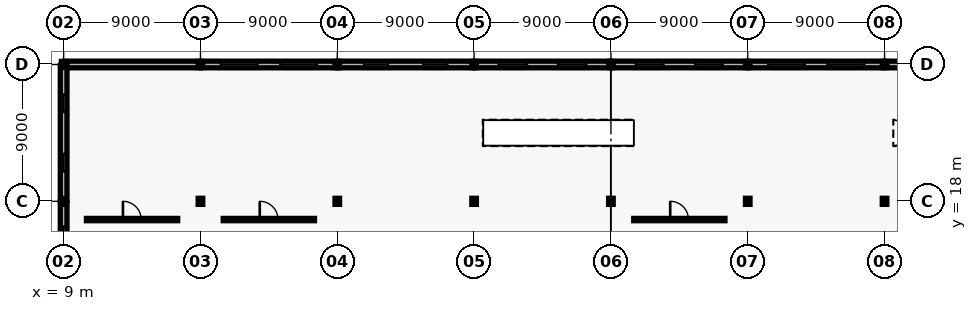
"""IFC4 building model, lengths in metres.
Left out: names, types, materials, properties, quantities, classifications, styles, units other than length and angle.
Written with IfcOpenShell. Run it as: python <this file> out.ifc"""

import sys

from ifc_helpers import new_model, si_unit, direction, frame, frame_2d, origin, origin_2d, place, context, subcontext, project, spatial, rectangle, i_section, extrude, element, fill, save


model = new_model("IFC4")
c1 = context("Model", 3, precision=1e-05, world=origin(), true_north=direction((0.0, 1.0)))
c2 = subcontext(c1, "Body", "Model", "MODEL_VIEW")
j1 = project(units=[si_unit("LENGTHUNIT", "METRE"), si_unit("PLANEANGLEUNIT", "RADIAN")], contexts=[c1])
p1 = place(None, origin())
s1 = spatial("IfcSite", under=j1, at=p1, CompositionType="ELEMENT")
p2 = place(p1, origin())
s2 = spatial("IfcBuilding", under=s1, at=p2, CompositionType="ELEMENT")
p3 = place(p2, frame((0.0, 0.0, 5.4)))
s3 = spatial("IfcBuildingStorey", under=s2, at=p3, CompositionType="ELEMENT", Elevation=5.4)
for number, where, z_axis, x_axis in (
    (1, (9.0, 18.0, 0.0), (0.0, 0.0, 1.0), (1.0, 0.0, 0.0)),
    (2, (9.0, 27.0, 0.0), (0.0, 0.0, 1.0), (1.0, 0.0, 0.0)),
    (3, (18.0, 18.0, 0.0), (0.0, 0.0, 1.0), (1.0, 0.0, 0.0)),
    (4, (18.0, 27.0, 0.0), (0.0, 0.0, 1.0), (1.0, 0.0, 0.0)),
    (5, (27.0, 18.0, 0.0), (0.0, 0.0, 1.0), (1.0, 0.0, 0.0)),
    (6, (27.0, 27.0, 0.0), (0.0, 0.0, 1.0), (1.0, 0.0, 0.0)),
    (7, (36.0, 18.0, 0.0), (0.0, 0.0, 1.0), (1.0, 0.0, 0.0)),
    (8, (36.0, 27.0, 0.0), (0.0, 0.0, 1.0), (1.0, 0.0, 0.0)),
    (9, (45.0, 18.0, 0.0), (0.0, 0.0, 1.0), (1.0, 0.0, 0.0)),
    (10, (45.0, 27.0, 0.0), (0.0, 0.0, 1.0), (1.0, 0.0, 0.0)),
    (11, (54.0, 18.0, 0.0), (0.0, 0.0, 1.0), (1.0, 0.0, 0.0)),
    (12, (54.0, 27.0, 0.0), (0.0, 0.0, 1.0), (1.0, 0.0, 0.0)),
    (13, (63.0, 18.0, 0.0), (0.0, 0.0, 1.0), (1.0, 0.0, 0.0)),
    (14, (63.0, 27.0, 0.0), (0.0, 0.0, 1.0), (1.0, 0.0, 0.0)),
):
    element("IfcColumn", number, at=place(p3, frame(where, z_axis=z_axis, x_axis=x_axis)), inside=s3, PredefinedType="COLUMN", context=c2, shape_type="SweptSolid", body=[
        extrude(i_section(OverallWidth=0.3, OverallDepth=0.4, WebThickness=0.013, FlangeThickness=0.024, FilletRadius=0.027, at=origin_2d()), origin(), (0.0, 0.0, 1.0), 4.2),
    ])
p4 = place(p3, frame((9.06, 27.0, 0.0), z_axis=(0.0, 0.0, 1.0), x_axis=(1.0, 0.0, 0.0)))
e15 = element("IfcWall", 15, at=p4, inside=s3, PredefinedType="SOLIDWALL", context=c2, shape_type="SweptSolid", body=[
    extrude(rectangle(XDim=8.88, YDim=0.44, at=frame_2d((4.44, 0.0))), origin(), (0.0, 0.0, 1.0), 3.5),
])
p5 = place(p3, frame((18.06, 27.0, 0.0), z_axis=(0.0, 0.0, 1.0), x_axis=(1.0, 0.0, 0.0)))
e16 = element("IfcWall", 16, at=p5, inside=s3, PredefinedType="SOLIDWALL", context=c2, shape_type="SweptSolid", body=[
    extrude(rectangle(XDim=8.88, YDim=0.44, at=frame_2d((4.44, 0.0))), origin(), (0.0, 0.0, 1.0), 3.5),
])
p6 = place(p5, frame((1.286, 0.0, 0.9)))
e17 = element("IfcOpeningElement", 17, at=p6, cuts=e16, PredefinedType="OPENING", context=c2, shape_type="SweptSolid", body=[
    extrude(rectangle(XDim=2.4, YDim=2.1, at=frame_2d((1.2, 1.05))), frame((0.0, 0.23, 0.0), z_axis=(0.0, -1.0, 0.0), x_axis=(1.0, 0.0, 0.0)), (0.0, 0.0, 1.0), 0.46),
])
p7 = place(p5, frame((5.194, 0.0, 0.9)))
e18 = element("IfcOpeningElement", 18, at=p7, cuts=e16, PredefinedType="OPENING", context=c2, shape_type="SweptSolid", body=[
    extrude(rectangle(XDim=2.4, YDim=2.1, at=frame_2d((1.2, 1.05))), frame((0.0, 0.23, 0.0), z_axis=(0.0, -1.0, 0.0), x_axis=(1.0, 0.0, 0.0)), (0.0, 0.0, 1.0), 0.46),
])
p8 = place(p3, frame((27.06, 27.0, 0.0), z_axis=(0.0, 0.0, 1.0), x_axis=(1.0, 0.0, 0.0)))
e19 = element("IfcWall", 19, at=p8, inside=s3, PredefinedType="SOLIDWALL", context=c2, shape_type="SweptSolid", body=[
    extrude(rectangle(XDim=8.88, YDim=0.44, at=frame_2d((4.44, 0.0))), origin(), (0.0, 0.0, 1.0), 3.5),
])
p9 = place(p8, frame((1.711, 0.0, 0.9)))
e20 = element("IfcOpeningElement", 20, at=p9, cuts=e19, PredefinedType="OPENING", context=c2, shape_type="SweptSolid", body=[
    extrude(rectangle(XDim=1.55, YDim=1.95, at=frame_2d((0.775, 0.975))), frame((0.0, 0.23, 0.0), z_axis=(0.0, -1.0, 0.0), x_axis=(1.0, 0.0, 0.0)), (0.0, 0.0, 1.0), 0.46),
])
p10 = place(p8, frame((5.619, 0.0, 0.9)))
e21 = element("IfcOpeningElement", 21, at=p10, cuts=e19, PredefinedType="OPENING", context=c2, shape_type="SweptSolid", body=[
    extrude(rectangle(XDim=1.55, YDim=1.95, at=frame_2d((0.775, 0.975))), frame((0.0, 0.23, 0.0), z_axis=(0.0, -1.0, 0.0), x_axis=(1.0, 0.0, 0.0)), (0.0, 0.0, 1.0), 0.46),
])
p11 = place(p3, frame((36.06, 27.0, 0.0), z_axis=(0.0, 0.0, 1.0), x_axis=(1.0, 0.0, 0.0)))
e22 = element("IfcWall", 22, at=p11, inside=s3, PredefinedType="SOLIDWALL", context=c2, shape_type="SweptSolid", body=[
    extrude(rectangle(XDim=8.88, YDim=0.44, at=frame_2d((4.44, 0.0))), origin(), (0.0, 0.0, 1.0), 3.5),
])
p12 = place(p11, frame((1.561, 0.0, 0.9)))
e23 = element("IfcOpeningElement", 23, at=p12, cuts=e22, PredefinedType="OPENING", context=c2, shape_type="SweptSolid", body=[
    extrude(rectangle(XDim=1.85, YDim=2.05, at=frame_2d((0.925, 1.025))), frame((0.0, 0.23, 0.0), z_axis=(0.0, -1.0, 0.0), x_axis=(1.0, 0.0, 0.0)), (0.0, 0.0, 1.0), 0.46),
])
p13 = place(p11, frame((5.469, 0.0, 0.9)))
e24 = element("IfcOpeningElement", 24, at=p13, cuts=e22, PredefinedType="OPENING", context=c2, shape_type="SweptSolid", body=[
    extrude(rectangle(XDim=1.85, YDim=2.05, at=frame_2d((0.925, 1.025))), frame((0.0, 0.23, 0.0), z_axis=(0.0, -1.0, 0.0), x_axis=(1.0, 0.0, 0.0)), (0.0, 0.0, 1.0), 0.46),
])
p14 = place(p3, frame((45.06, 27.0, 0.0), z_axis=(0.0, 0.0, 1.0), x_axis=(1.0, 0.0, 0.0)))
e25 = element("IfcWall", 25, at=p14, inside=s3, PredefinedType="SOLIDWALL", context=c2, shape_type="SweptSolid", body=[
    extrude(rectangle(XDim=8.88, YDim=0.44, at=frame_2d((4.44, 0.0))), origin(), (0.0, 0.0, 1.0), 3.5),
])
p15 = place(p14, frame((1.586, 0.0, 0.9)))
e26 = element("IfcOpeningElement", 26, at=p15, cuts=e25, PredefinedType="OPENING", context=c2, shape_type="SweptSolid", body=[
    extrude(rectangle(XDim=1.8, YDim=2.1, at=frame_2d((0.9, 1.05))), frame((0.0, 0.23, 0.0), z_axis=(0.0, -1.0, 0.0), x_axis=(1.0, 0.0, 0.0)), (0.0, 0.0, 1.0), 0.46),
])
p16 = place(p14, frame((5.494, 0.0, 0.9)))
e27 = element("IfcOpeningElement", 27, at=p16, cuts=e25, PredefinedType="OPENING", context=c2, shape_type="SweptSolid", body=[
    extrude(rectangle(XDim=1.8, YDim=2.1, at=frame_2d((0.9, 1.05))), frame((0.0, 0.23, 0.0), z_axis=(0.0, -1.0, 0.0), x_axis=(1.0, 0.0, 0.0)), (0.0, 0.0, 1.0), 0.46),
])
p17 = place(p3, frame((54.06, 27.0, 0.0), z_axis=(0.0, 0.0, 1.0), x_axis=(1.0, 0.0, 0.0)))
e28 = element("IfcWall", 28, at=p17, inside=s3, PredefinedType="SOLIDWALL", context=c2, shape_type="SweptSolid", body=[
    extrude(rectangle(XDim=8.88, YDim=0.44, at=frame_2d((4.44, 0.0))), origin(), (0.0, 0.0, 1.0), 3.5),
])
p18 = place(p17, frame((1.286, 0.0, 0.9)))
e29 = element("IfcOpeningElement", 29, at=p18, cuts=e28, PredefinedType="OPENING", context=c2, shape_type="SweptSolid", body=[
    extrude(rectangle(XDim=2.4, YDim=2.1, at=frame_2d((1.2, 1.05))), frame((0.0, 0.23, 0.0), z_axis=(0.0, -1.0, 0.0), x_axis=(1.0, 0.0, 0.0)), (0.0, 0.0, 1.0), 0.46),
])
p19 = place(p17, frame((5.194, 0.0, 0.9)))
e30 = element("IfcOpeningElement", 30, at=p19, cuts=e28, PredefinedType="OPENING", context=c2, shape_type="SweptSolid", body=[
    extrude(rectangle(XDim=2.4, YDim=2.1, at=frame_2d((1.2, 1.05))), frame((0.0, 0.23, 0.0), z_axis=(0.0, -1.0, 0.0), x_axis=(1.0, 0.0, 0.0)), (0.0, 0.0, 1.0), 0.46),
])
p20 = place(p3, frame((63.06, 27.0, 0.0), z_axis=(0.0, 0.0, 1.0), x_axis=(1.0, 0.0, 0.0)))
e31 = element("IfcWall", 31, at=p20, inside=s3, PredefinedType="SOLIDWALL", context=c2, shape_type="SweptSolid", body=[
    extrude(rectangle(XDim=8.88, YDim=0.44, at=frame_2d((4.44, 0.0))), origin(), (0.0, 0.0, 1.0), 3.5),
])
p21 = place(p20, frame((1.711, 0.0, 0.9)))
e32 = element("IfcOpeningElement", 32, at=p21, cuts=e31, PredefinedType="OPENING", context=c2, shape_type="SweptSolid", body=[
    extrude(rectangle(XDim=1.55, YDim=1.95, at=frame_2d((0.775, 0.975))), frame((0.0, 0.23, 0.0), z_axis=(0.0, -1.0, 0.0), x_axis=(1.0, 0.0, 0.0)), (0.0, 0.0, 1.0), 0.46),
])
p22 = place(p20, frame((5.619, 0.0, 0.9)))
e33 = element("IfcOpeningElement", 33, at=p22, cuts=e31, PredefinedType="OPENING", context=c2, shape_type="SweptSolid", body=[
    extrude(rectangle(XDim=1.55, YDim=1.95, at=frame_2d((0.775, 0.975))), frame((0.0, 0.23, 0.0), z_axis=(0.0, -1.0, 0.0), x_axis=(1.0, 0.0, 0.0)), (0.0, 0.0, 1.0), 0.46),
])
p23 = place(p3, frame((9.0, 9.06, 0.0), z_axis=(0.0, 0.0, 1.0), x_axis=(0.0, 1.0, 0.0)))
e34 = element("IfcWall", 34, at=p23, inside=s3, PredefinedType="SOLIDWALL", context=c2, shape_type="SweptSolid", body=[
    extrude(rectangle(XDim=8.88, YDim=0.44, at=frame_2d((4.44, 0.0))), origin(), (0.0, 0.0, 1.0), 3.5),
])
p24 = place(p23, frame((1.611, 0.0, 0.9)))
e35 = element("IfcOpeningElement", 35, at=p24, cuts=e34, PredefinedType="OPENING", context=c2, shape_type="SweptSolid", body=[
    extrude(rectangle(XDim=1.75, YDim=2.25, at=frame_2d((0.875, 1.125))), frame((0.0, 0.23, 0.0), z_axis=(0.0, -1.0, 0.0), x_axis=(1.0, 0.0, 0.0)), (0.0, 0.0, 1.0), 0.46),
])
p25 = place(p23, frame((5.519, 0.0, 0.9)))
e36 = element("IfcOpeningElement", 36, at=p25, cuts=e34, PredefinedType="OPENING", context=c2, shape_type="SweptSolid", body=[
    extrude(rectangle(XDim=1.75, YDim=2.25, at=frame_2d((0.875, 1.125))), frame((0.0, 0.23, 0.0), z_axis=(0.0, -1.0, 0.0), x_axis=(1.0, 0.0, 0.0)), (0.0, 0.0, 1.0), 0.46),
])
p26 = place(p3, frame((9.0, 18.06, 0.0), z_axis=(0.0, 0.0, 1.0), x_axis=(0.0, 1.0, 0.0)))
e37 = element("IfcWall", 37, at=p26, inside=s3, PredefinedType="SOLIDWALL", context=c2, shape_type="SweptSolid", body=[
    extrude(rectangle(XDim=8.88, YDim=0.44, at=frame_2d((4.44, 0.0))), origin(), (0.0, 0.0, 1.0), 3.5),
])
p27 = place(p26, frame((1.911, 0.0, 0.9)))
e38 = element("IfcOpeningElement", 38, at=p27, cuts=e37, PredefinedType="OPENING", context=c2, shape_type="SweptSolid", body=[
    extrude(rectangle(XDim=1.15, YDim=1.75, at=frame_2d((0.575, 0.875))), frame((0.0, 0.23, 0.0), z_axis=(0.0, -1.0, 0.0), x_axis=(1.0, 0.0, 0.0)), (0.0, 0.0, 1.0), 0.46),
])
p28 = place(p26, frame((5.819, 0.0, 0.9)))
e39 = element("IfcOpeningElement", 39, at=p28, cuts=e37, PredefinedType="OPENING", context=c2, shape_type="SweptSolid", body=[
    extrude(rectangle(XDim=1.15, YDim=1.75, at=frame_2d((0.575, 0.875))), frame((0.0, 0.23, 0.0), z_axis=(0.0, -1.0, 0.0), x_axis=(1.0, 0.0, 0.0)), (0.0, 0.0, 1.0), 0.46),
])
p29 = place(p3, frame((10.5, 16.8, 0.0), z_axis=(0.0, 0.0, 1.0), x_axis=(1.0, 0.0, 0.0)))
e40 = element("IfcWall", 40, at=p29, inside=s3, PredefinedType="PARTITIONING", context=c2, shape_type="SweptSolid", body=[
    extrude(rectangle(XDim=6.0, YDim=0.15, at=frame_2d((3.0, 0.0))), origin(), (0.0, 0.0, 1.0), 3.2),
])
p30 = place(p29, frame((2.4, 0.0, 0.0)))
e41 = element("IfcOpeningElement", 41, at=p30, cuts=e40, PredefinedType="OPENING", context=c2, shape_type="SweptSolid", body=[
    extrude(rectangle(XDim=1.2, YDim=2.2, at=frame_2d((0.6, 1.1))), frame((0.0, 0.085, 0.0), z_axis=(0.0, -1.0, 0.0), x_axis=(1.0, 0.0, 0.0)), (0.0, 0.0, 1.0), 0.17),
])
p31 = place(p3, frame((19.5, 16.8, 0.0), z_axis=(0.0, 0.0, 1.0), x_axis=(1.0, 0.0, 0.0)))
e42 = element("IfcWall", 42, at=p31, inside=s3, PredefinedType="PARTITIONING", context=c2, shape_type="SweptSolid", body=[
    extrude(rectangle(XDim=6.0, YDim=0.15, at=frame_2d((3.0, 0.0))), origin(), (0.0, 0.0, 1.0), 3.2),
])
p32 = place(p31, frame((2.4, 0.0, 0.0)))
e43 = element("IfcOpeningElement", 43, at=p32, cuts=e42, PredefinedType="OPENING", context=c2, shape_type="SweptSolid", body=[
    extrude(rectangle(XDim=1.2, YDim=2.2, at=frame_2d((0.6, 1.1))), frame((0.0, 0.085, 0.0), z_axis=(0.0, -1.0, 0.0), x_axis=(1.0, 0.0, 0.0)), (0.0, 0.0, 1.0), 0.17),
])
p33 = place(p3, frame((46.5, 16.8, 0.0), z_axis=(0.0, 0.0, 1.0), x_axis=(1.0, 0.0, 0.0)))
e44 = element("IfcWall", 44, at=p33, inside=s3, PredefinedType="PARTITIONING", context=c2, shape_type="SweptSolid", body=[
    extrude(rectangle(XDim=6.0, YDim=0.15, at=frame_2d((3.0, 0.0))), origin(), (0.0, 0.0, 1.0), 3.2),
])
p34 = place(p33, frame((2.4, 0.0, 0.0)))
e45 = element("IfcOpeningElement", 45, at=p34, cuts=e44, PredefinedType="OPENING", context=c2, shape_type="SweptSolid", body=[
    extrude(rectangle(XDim=1.2, YDim=2.2, at=frame_2d((0.6, 1.1))), frame((0.0, 0.085, 0.0), z_axis=(0.0, -1.0, 0.0), x_axis=(1.0, 0.0, 0.0)), (0.0, 0.0, 1.0), 0.17),
])
p35 = place(p6, origin())
e46 = element("IfcWindow", 46, at=p35, inside=s3, PartitioningType="SINGLE_PANEL", PredefinedType="WINDOW", context=c2, shape_type="SweptSolid", body=[
    extrude(rectangle(XDim=2.4, YDim=2.1, at=frame_2d((1.2, 1.05))), frame((0.0, 0.03, 0.0), z_axis=(0.0, -1.0, 0.0), x_axis=(1.0, 0.0, 0.0)), (0.0, 0.0, 1.0), 0.06),
])
fill(e17, e46)
p36 = place(p7, origin())
e47 = element("IfcWindow", 47, at=p36, inside=s3, PartitioningType="SINGLE_PANEL", PredefinedType="WINDOW", context=c2, shape_type="SweptSolid", body=[
    extrude(rectangle(XDim=2.4, YDim=2.1, at=frame_2d((1.2, 1.05))), frame((0.0, 0.03, 0.0), z_axis=(0.0, -1.0, 0.0), x_axis=(1.0, 0.0, 0.0)), (0.0, 0.0, 1.0), 0.06),
])
fill(e18, e47)
p37 = place(p9, origin())
e48 = element("IfcWindow", 48, at=p37, inside=s3, PartitioningType="SINGLE_PANEL", PredefinedType="WINDOW", context=c2, shape_type="SweptSolid", body=[
    extrude(rectangle(XDim=1.55, YDim=1.95, at=frame_2d((0.775, 0.975))), frame((0.0, 0.03, 0.0), z_axis=(0.0, -1.0, 0.0), x_axis=(1.0, 0.0, 0.0)), (0.0, 0.0, 1.0), 0.06),
])
fill(e20, e48)
p38 = place(p10, origin())
e49 = element("IfcWindow", 49, at=p38, inside=s3, PartitioningType="SINGLE_PANEL", PredefinedType="WINDOW", context=c2, shape_type="SweptSolid", body=[
    extrude(rectangle(XDim=1.55, YDim=1.95, at=frame_2d((0.775, 0.975))), frame((0.0, 0.03, 0.0), z_axis=(0.0, -1.0, 0.0), x_axis=(1.0, 0.0, 0.0)), (0.0, 0.0, 1.0), 0.06),
])
fill(e21, e49)
p39 = place(p12, origin())
e50 = element("IfcWindow", 50, at=p39, inside=s3, PartitioningType="SINGLE_PANEL", PredefinedType="WINDOW", context=c2, shape_type="SweptSolid", body=[
    extrude(rectangle(XDim=1.85, YDim=2.05, at=frame_2d((0.925, 1.025))), frame((0.0, 0.03, 0.0), z_axis=(0.0, -1.0, 0.0), x_axis=(1.0, 0.0, 0.0)), (0.0, 0.0, 1.0), 0.06),
])
fill(e23, e50)
p40 = place(p13, origin())
e51 = element("IfcWindow", 51, at=p40, inside=s3, PartitioningType="SINGLE_PANEL", PredefinedType="WINDOW", context=c2, shape_type="SweptSolid", body=[
    extrude(rectangle(XDim=1.85, YDim=2.05, at=frame_2d((0.925, 1.025))), frame((0.0, 0.03, 0.0), z_axis=(0.0, -1.0, 0.0), x_axis=(1.0, 0.0, 0.0)), (0.0, 0.0, 1.0), 0.06),
])
fill(e24, e51)
p41 = place(p15, origin())
e52 = element("IfcWindow", 52, at=p41, inside=s3, PartitioningType="SINGLE_PANEL", PredefinedType="WINDOW", context=c2, shape_type="SweptSolid", body=[
    extrude(rectangle(XDim=1.8, YDim=2.1, at=frame_2d((0.9, 1.05))), frame((0.0, 0.03, 0.0), z_axis=(0.0, -1.0, 0.0), x_axis=(1.0, 0.0, 0.0)), (0.0, 0.0, 1.0), 0.06),
])
fill(e26, e52)
p42 = place(p16, origin())
e53 = element("IfcWindow", 53, at=p42, inside=s3, PartitioningType="SINGLE_PANEL", PredefinedType="WINDOW", context=c2, shape_type="SweptSolid", body=[
    extrude(rectangle(XDim=1.8, YDim=2.1, at=frame_2d((0.9, 1.05))), frame((0.0, 0.03, 0.0), z_axis=(0.0, -1.0, 0.0), x_axis=(1.0, 0.0, 0.0)), (0.0, 0.0, 1.0), 0.06),
])
fill(e27, e53)
p43 = place(p18, origin())
e54 = element("IfcWindow", 54, at=p43, inside=s3, PartitioningType="SINGLE_PANEL", PredefinedType="WINDOW", context=c2, shape_type="SweptSolid", body=[
    extrude(rectangle(XDim=2.4, YDim=2.1, at=frame_2d((1.2, 1.05))), frame((0.0, 0.03, 0.0), z_axis=(0.0, -1.0, 0.0), x_axis=(1.0, 0.0, 0.0)), (0.0, 0.0, 1.0), 0.06),
])
fill(e29, e54)
p44 = place(p19, origin())
e55 = element("IfcWindow", 55, at=p44, inside=s3, PartitioningType="SINGLE_PANEL", PredefinedType="WINDOW", context=c2, shape_type="SweptSolid", body=[
    extrude(rectangle(XDim=2.4, YDim=2.1, at=frame_2d((1.2, 1.05))), frame((0.0, 0.03, 0.0), z_axis=(0.0, -1.0, 0.0), x_axis=(1.0, 0.0, 0.0)), (0.0, 0.0, 1.0), 0.06),
])
fill(e30, e55)
p45 = place(p25, origin())
e56 = element("IfcWindow", 56, at=p45, inside=s3, PartitioningType="SINGLE_PANEL", PredefinedType="WINDOW", context=c2, shape_type="SweptSolid", body=[
    extrude(rectangle(XDim=1.75, YDim=2.25, at=frame_2d((0.875, 1.125))), frame((0.0, 0.03, 0.0), z_axis=(0.0, -1.0, 0.0), x_axis=(1.0, 0.0, 0.0)), (0.0, 0.0, 1.0), 0.06),
])
fill(e36, e56)
p46 = place(p27, origin())
e57 = element("IfcWindow", 57, at=p46, inside=s3, PartitioningType="SINGLE_PANEL", PredefinedType="WINDOW", context=c2, shape_type="SweptSolid", body=[
    extrude(rectangle(XDim=1.15, YDim=1.75, at=frame_2d((0.575, 0.875))), frame((0.0, 0.03, 0.0), z_axis=(0.0, -1.0, 0.0), x_axis=(1.0, 0.0, 0.0)), (0.0, 0.0, 1.0), 0.06),
])
fill(e38, e57)
p47 = place(p28, origin())
e58 = element("IfcWindow", 58, at=p47, inside=s3, PartitioningType="SINGLE_PANEL", PredefinedType="WINDOW", context=c2, shape_type="SweptSolid", body=[
    extrude(rectangle(XDim=1.15, YDim=1.75, at=frame_2d((0.575, 0.875))), frame((0.0, 0.03, 0.0), z_axis=(0.0, -1.0, 0.0), x_axis=(1.0, 0.0, 0.0)), (0.0, 0.0, 1.0), 0.06),
])
fill(e39, e58)
p48 = place(p30, origin())
e59 = element("IfcDoor", 59, at=p48, inside=s3, OperationType="SINGLE_SWING_LEFT", PredefinedType="DOOR", context=c2, shape_type="SweptSolid", body=[
    extrude(rectangle(XDim=1.2, YDim=2.2, at=frame_2d((0.6, 1.1))), frame((0.0, 0.025, 0.0), z_axis=(0.0, -1.0, 0.0), x_axis=(1.0, 0.0, 0.0)), (0.0, 0.0, 1.0), 0.05),
])
fill(e41, e59)
p49 = place(p32, origin())
e60 = element("IfcDoor", 60, at=p49, inside=s3, OperationType="SINGLE_SWING_LEFT", PredefinedType="DOOR", context=c2, shape_type="SweptSolid", body=[
    extrude(rectangle(XDim=1.2, YDim=2.2, at=frame_2d((0.6, 1.1))), frame((0.0, 0.025, 0.0), z_axis=(0.0, -1.0, 0.0), x_axis=(1.0, 0.0, 0.0)), (0.0, 0.0, 1.0), 0.05),
])
fill(e43, e60)
p50 = place(p34, origin())
e61 = element("IfcDoor", 61, at=p50, inside=s3, OperationType="SINGLE_SWING_LEFT", PredefinedType="DOOR", context=c2, shape_type="SweptSolid", body=[
    extrude(rectangle(XDim=1.2, YDim=2.2, at=frame_2d((0.6, 1.1))), frame((0.0, 0.025, 0.0), z_axis=(0.0, -1.0, 0.0), x_axis=(1.0, 0.0, 0.0)), (0.0, 0.0, 1.0), 0.05),
])
fill(e45, e61)
save(model, sys.argv[1])
